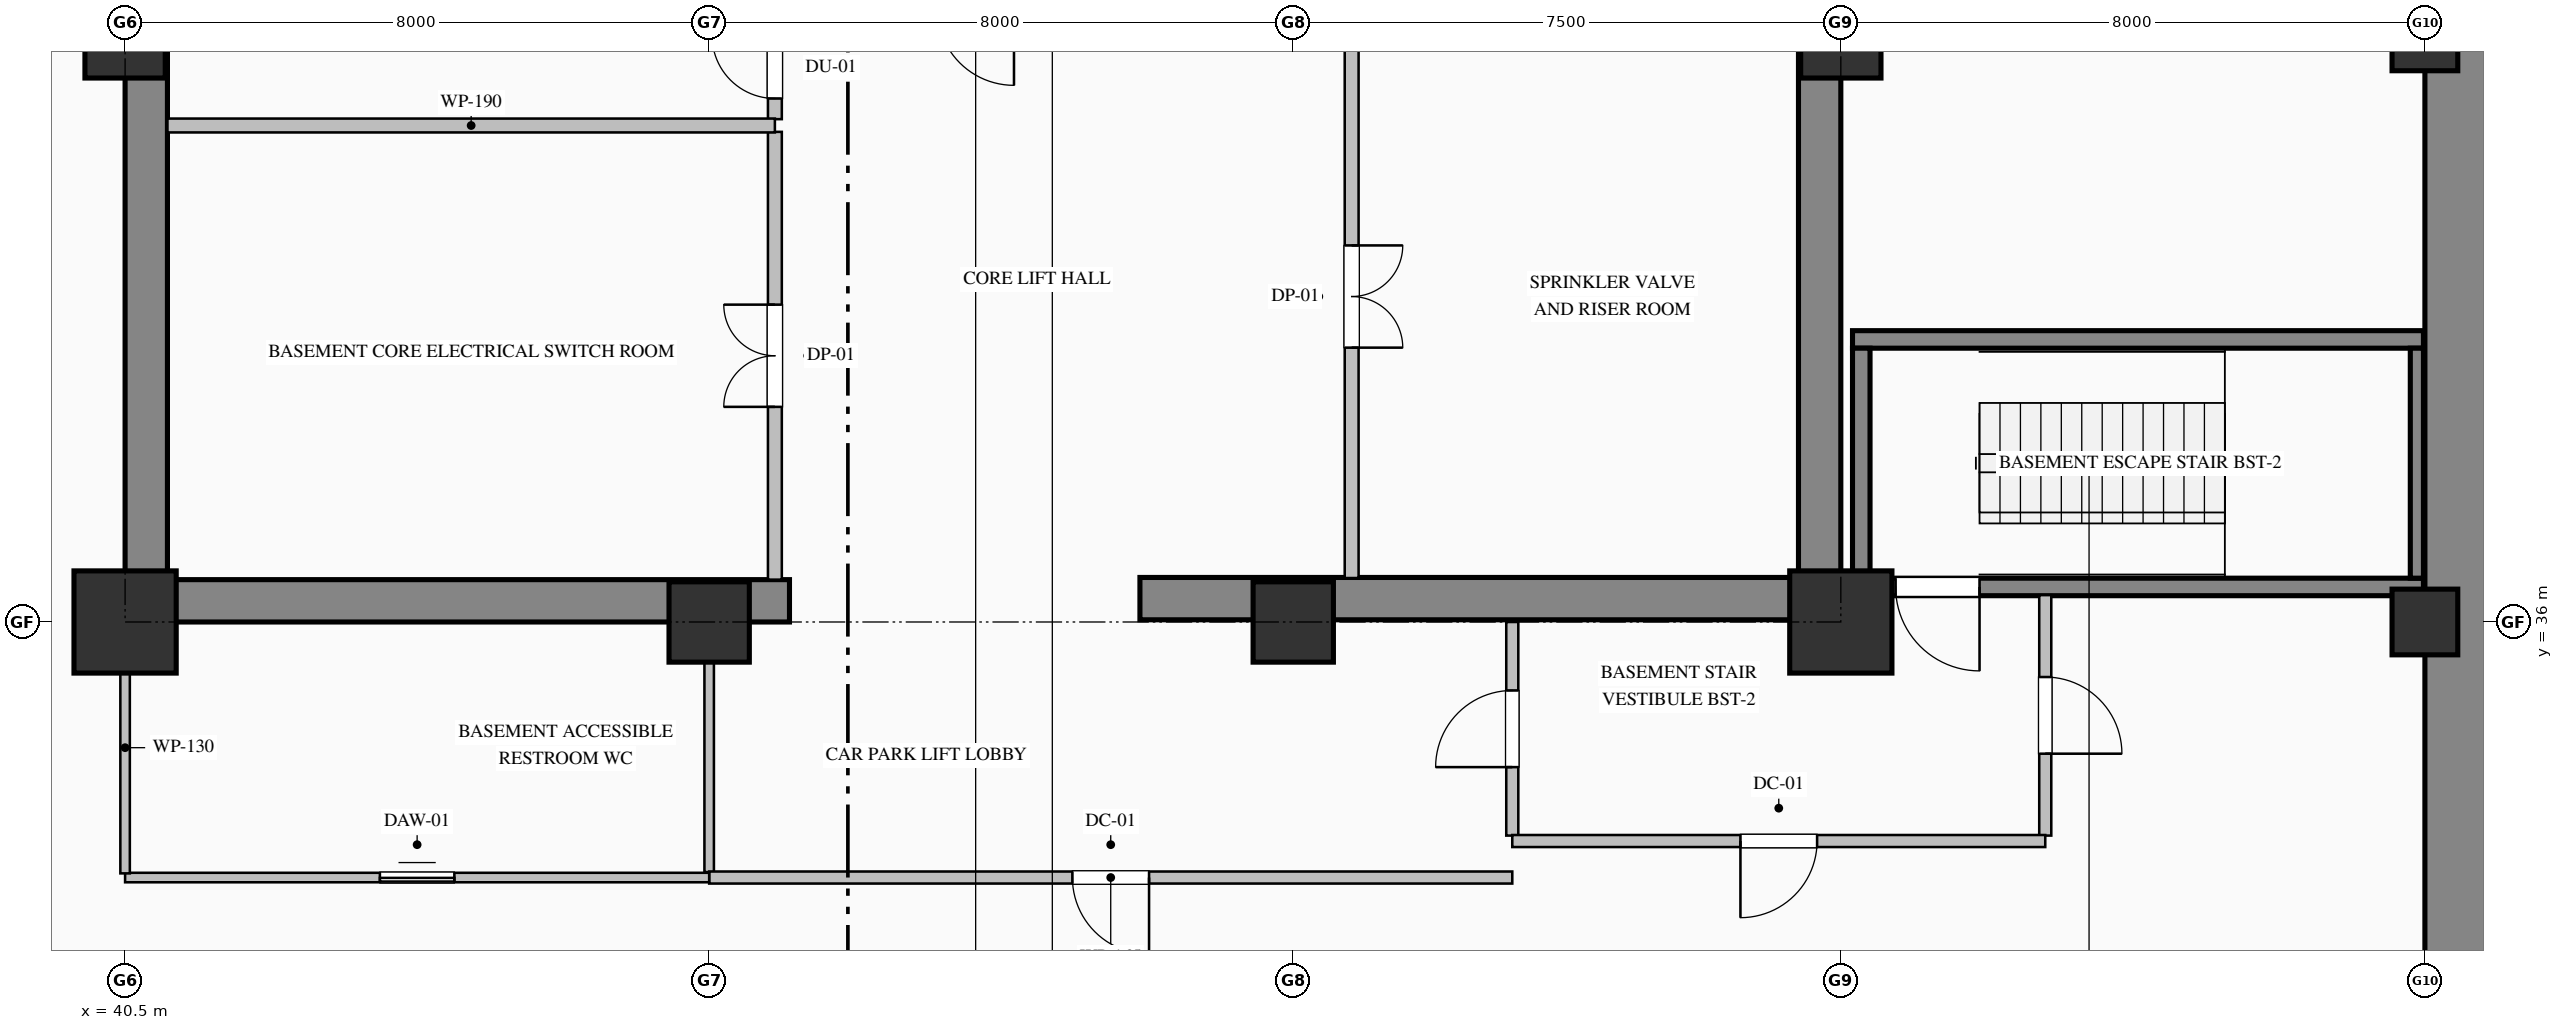
"""IFC4 building model, lengths in metres.
Left out: names, types, materials, properties, quantities, classifications, styles, units other than length and angle.
Written with IfcOpenShell. Run it as: python <this file> out.ifc"""

import sys

from ifc_helpers import new_model, si_unit, direction, frame, frame_2d, origin, origin_2d, place, context, subcontext, project, spatial, rectangle, hollow_rectangle, extrude, element, fill, save


model = new_model("IFC4")
c1 = context("Model", 3, precision=1e-05, world=origin(), true_north=direction((0.0, 1.0)))
c2 = subcontext(c1, "Body", "Model", "MODEL_VIEW")
j1 = project(units=[si_unit("LENGTHUNIT", "METRE"), si_unit("PLANEANGLEUNIT", "RADIAN")], contexts=[c1])
p1 = place(None, origin())
s1 = spatial("IfcSite", under=j1, at=p1, CompositionType="ELEMENT")
p2 = place(p1, origin())
s2 = spatial("IfcBuilding", under=s1, at=p2, CompositionType="ELEMENT")
p3 = place(p2, frame((0.0, 0.0, -13.8)))
s3 = spatial("IfcBuildingStorey", under=s2, at=p3, CompositionType="ELEMENT", Elevation=-13.8)
p4 = place(p3, frame((72.6, 0.0, -0.5), z_axis=(0.0, 0.0, 1.0), x_axis=(0.0, 1.0, 0.0)))
e1 = element("IfcWall", 1, at=p4, inside=s3, PredefinedType="USERDEFINED", context=c2, shape_type="SweptSolid", body=[
    extrude(rectangle(XDim=50.8, YDim=1.2, at=frame_2d((25.4, 0.0))), origin(), (0.0, 0.0, 1.0), 5.1),
])
p5 = place(p3, frame((63.71, 36.32, -0.5), z_axis=(0.0, 0.0, 1.0), x_axis=(0.0, 1.0, 0.0)))
e2 = element("IfcWall", 2, at=p5, inside=s3, PredefinedType="SHEAR", context=c2, shape_type="SweptSolid", body=[
    extrude(rectangle(XDim=15.1, YDim=0.58, at=frame_2d((7.55, 0.0))), origin(), (0.0, 0.0, 1.0), 4.74),
])
p6 = place(p3, frame((40.79, 36.58, -0.5), z_axis=(0.0, 0.0, 1.0), x_axis=(0.0, 1.0, 0.0)))
e3 = element("IfcWall", 3, at=p6, inside=s3, PredefinedType="SHEAR", context=c2, shape_type="SweptSolid", body=[
    extrude(rectangle(XDim=7.82, YDim=0.58, at=frame_2d((3.91, 0.0))), origin(), (0.0, 0.0, 1.0), 4.74),
])
p7 = place(p3, frame((40.5, 36.29, -0.5), z_axis=(0.0, 0.0, 1.0), x_axis=(1.0, 0.0, 0.0)))
e4 = element("IfcWall", 4, at=p7, inside=s3, PredefinedType="SHEAR", context=c2, shape_type="SweptSolid", body=[
    extrude(rectangle(XDim=9.1, YDim=0.58, at=frame_2d((4.55, 0.0))), origin(), (0.0, 0.0, 1.0), 4.74),
])
p8 = place(p3, frame((54.4, 36.32, -0.5), z_axis=(0.0, 0.0, 1.0), x_axis=(1.0, 0.0, 0.0)))
e5 = element("IfcWall", 5, at=p8, inside=s3, PredefinedType="SHEAR", context=c2, shape_type="SweptSolid", body=[
    extrude(rectangle(XDim=9.6, YDim=0.58, at=frame_2d((4.8, 0.0))), origin(), (0.0, 0.0, 1.0), 5.1),
])
p9 = place(p3, frame((40.5, 36.0, -0.5), z_axis=(0.0, 0.0, 1.0), x_axis=(1.0, 0.0, 0.0)))
e6 = element("IfcColumn", 6, at=p9, inside=s3, PredefinedType="COLUMN", context=c2, shape_type="SweptSolid", body=[
    extrude(hollow_rectangle(XDim=1.4, YDim=1.4, WallThickness=0.05, at=origin_2d()), origin(), (0.0, 0.0, 1.0), 5.1),
])
for number, where, z_axis, x_axis in (
    (7, (40.5, 44.0, -0.5), (0.0, 0.0, 1.0), (1.0, 0.0, 0.0)),
    (8, (48.5, 36.0, -0.5), (0.0, 0.0, 1.0), (1.0, 0.0, 0.0)),
    (9, (56.5, 36.0, -0.5), (0.0, 0.0, 1.0), (1.0, 0.0, 0.0)),
):
    element("IfcColumn", number, at=place(p3, frame(where, z_axis=z_axis, x_axis=x_axis)), inside=s3, PredefinedType="COLUMN", context=c2, shape_type="SweptSolid", body=[
        extrude(rectangle(XDim=1.1, YDim=1.1, at=origin_2d()), origin(), (0.0, 0.0, 1.0), 5.1),
    ])
p10 = place(p3, frame((64.0, 36.0, -0.5), z_axis=(0.0, 0.0, 1.0), x_axis=(1.0, 0.0, 0.0)))
e10 = element("IfcColumn", 10, at=p10, inside=s3, PredefinedType="COLUMN", context=c2, shape_type="SweptSolid", body=[
    extrude(hollow_rectangle(XDim=1.4, YDim=1.4, WallThickness=0.05, at=origin_2d()), origin(), (0.0, 0.0, 1.0), 5.1),
])
p11 = place(p3, frame((64.0, 44.0, -0.5), z_axis=(0.0, 0.0, 1.0), x_axis=(1.0, 0.0, 0.0)))
e11 = element("IfcColumn", 11, at=p11, inside=s3, PredefinedType="COLUMN", context=c2, shape_type="SweptSolid", body=[
    extrude(rectangle(XDim=1.1, YDim=1.1, at=origin_2d()), origin(), (0.0, 0.0, 1.0), 5.1),
])
for number, where, z_axis, x_axis in (
    (12, (72.0, 36.0, -0.5), (0.0, 0.0, 1.0), (1.0, 0.0, 0.0)),
    (13, (72.0, 44.0, -0.5), (0.0, 0.0, 1.0), (1.0, 0.0, 0.0)),
):
    element("IfcColumn", number, at=place(p3, frame(where, z_axis=z_axis, x_axis=x_axis)), inside=s3, PredefinedType="PILASTER", context=c2, shape_type="SweptSolid", body=[
        extrude(rectangle(XDim=0.9, YDim=0.9, at=origin_2d()), origin(), (0.0, 0.0, 1.0), 5.1),
    ])
p12 = place(p3, frame((64.16, 39.87, -0.5), z_axis=(0.0, 0.0, 1.0), x_axis=(1.0, 0.0, 0.0)))
e14 = element("IfcWall", 14, at=p12, inside=s3, PredefinedType="SOLIDWALL", context=c2, shape_type="SweptSolid", body=[
    extrude(rectangle(XDim=7.82, YDim=0.24, at=frame_2d((3.91, 0.0))), origin(), (0.0, 0.0, 1.0), 5.1),
])
p13 = place(p3, frame((71.98, 36.48, -0.5), z_axis=(0.0, 0.0, 1.0), x_axis=(-1.0, 0.0, 0.0)))
e15 = element("IfcWall", 15, at=p13, inside=s3, PredefinedType="SOLIDWALL", context=c2, shape_type="SweptSolid", body=[
    extrude(rectangle(XDim=7.82, YDim=0.24, at=frame_2d((3.91, 0.0))), origin(), (0.0, 0.0, 1.0), 5.1),
])
p14 = place(p13, frame((6.08, 0.0, 0.5)))
e16 = element("IfcOpeningElement", 16, at=p14, cuts=e15, PredefinedType="OPENING", context=c2, shape_type="SweptSolid", body=[
    extrude(rectangle(XDim=1.15, YDim=2.2, at=frame_2d((0.575, 1.1))), frame((0.0, 0.13, 0.0), z_axis=(0.0, -1.0, 0.0), x_axis=(1.0, 0.0, 0.0)), (0.0, 0.0, 1.0), 0.26),
])
p15 = place(p3, frame((64.28, 39.75, -0.5), z_axis=(0.0, 0.0, 1.0), x_axis=(0.0, -1.0, 0.0)))
e17 = element("IfcWall", 17, at=p15, inside=s3, PredefinedType="SOLIDWALL", context=c2, shape_type="SweptSolid", body=[
    extrude(rectangle(XDim=3.15, YDim=0.24, at=frame_2d((1.575, 0.0))), origin(), (0.0, 0.0, 1.0), 5.1),
])
p16 = place(p3, frame((71.89, 36.6, -0.5), z_axis=(0.0, 0.0, 1.0), x_axis=(0.0, 1.0, 0.0)))
e18 = element("IfcWall", 18, at=p16, inside=s3, PredefinedType="SOLIDWALL", context=c2, shape_type="SweptSolid", body=[
    extrude(rectangle(XDim=3.15, YDim=0.18, at=frame_2d((1.575, 0.0))), origin(), (0.0, 0.0, 1.0), 5.1),
])
p17 = place(p3, frame((49.4, 36.58, 0.0), z_axis=(0.0, 0.0, 1.0), x_axis=(0.0, 1.0, 0.0)))
e19 = element("IfcWall", 19, at=p17, inside=s3, PredefinedType="PARTITIONING", context=c2, shape_type="SweptSolid", body=[
    extrude(rectangle(XDim=6.133, YDim=0.19, at=frame_2d((3.066, 0.0))), origin(), (0.0, 0.0, 1.0), 3.332),
])
p18 = place(p17, frame((2.366, 0.0, 0.0)))
e20 = element("IfcOpeningElement", 20, at=p18, cuts=e19, PredefinedType="OPENING", context=c2, shape_type="SweptSolid", body=[
    extrude(rectangle(XDim=1.4, YDim=2.25, at=frame_2d((0.7, 1.125))), frame((0.0, 0.105, 0.0), z_axis=(0.0, -1.0, 0.0), x_axis=(1.0, 0.0, 0.0)), (0.0, 0.0, 1.0), 0.21),
])
p19 = place(p3, frame((49.4, 42.887, 0.0), z_axis=(0.0, 0.0, 1.0), x_axis=(0.0, 1.0, 0.0)))
e21 = element("IfcWall", 21, at=p19, inside=s3, PredefinedType="PARTITIONING", context=c2, shape_type="SweptSolid", body=[
    extrude(rectangle(XDim=1.426, YDim=0.19, at=frame_2d((0.713, 0.0))), origin(), (0.0, 0.0, 1.0), 3.332),
])
p20 = place(p19, frame((0.283, 0.0, 0.0)))
e22 = element("IfcOpeningElement", 22, at=p20, cuts=e21, PredefinedType="OPENING", context=c2, shape_type="SweptSolid", body=[
    extrude(rectangle(XDim=0.86, YDim=2.1, at=frame_2d((0.43, 1.05))), frame((0.0, 0.105, 0.0), z_axis=(0.0, -1.0, 0.0), x_axis=(1.0, 0.0, 0.0)), (0.0, 0.0, 1.0), 0.21),
])
p21 = place(p3, frame((57.3, 44.313, 0.0), z_axis=(0.0, 0.0, 1.0), x_axis=(0.0, -1.0, 0.0)))
e23 = element("IfcWall", 23, at=p21, inside=s3, PredefinedType="PARTITIONING", context=c2, shape_type="SweptSolid", body=[
    extrude(rectangle(XDim=7.711, YDim=0.19, at=frame_2d((3.855, 0.0))), origin(), (0.0, 0.0, 1.0), 4.24),
])
p22 = place(p21, frame((3.156, 0.0, 0.0)))
e24 = element("IfcOpeningElement", 24, at=p22, cuts=e23, PredefinedType="OPENING", context=c2, shape_type="SweptSolid", body=[
    extrude(rectangle(XDim=1.4, YDim=2.25, at=frame_2d((0.7, 1.125))), frame((0.0, 0.105, 0.0), z_axis=(0.0, -1.0, 0.0), x_axis=(1.0, 0.0, 0.0)), (0.0, 0.0, 1.0), 0.21),
])
p23 = place(p3, frame((41.08, 42.8, 0.0), z_axis=(0.0, 0.0, 1.0), x_axis=(1.0, 0.0, 0.0)))
e25 = element("IfcWall", 25, at=p23, inside=s3, PredefinedType="PARTITIONING", context=c2, shape_type="SweptSolid", body=[
    extrude(rectangle(XDim=8.32, YDim=0.19, at=frame_2d((4.16, 0.0))), origin(), (0.0, 0.0, 1.0), 4.24),
])
p24 = place(p3, frame((59.5, 33.074, 0.0), z_axis=(0.0, 0.0, 1.0), x_axis=(0.0, 1.0, 0.0)))
e26 = element("IfcWall", 26, at=p24, inside=s3, PredefinedType="PARTITIONING", context=c2, shape_type="SweptSolid", body=[
    extrude(rectangle(XDim=2.926, YDim=0.165, at=frame_2d((1.463, 0.0))), origin(), (0.0, 0.0, 1.0), 4.24),
])
p25 = place(p24, frame((0.938, 0.0, 0.0)))
e27 = element("IfcOpeningElement", 27, at=p25, cuts=e26, PredefinedType="OPENING", context=c2, shape_type="SweptSolid", body=[
    extrude(rectangle(XDim=1.05, YDim=2.15, at=frame_2d((0.525, 1.075))), frame((0.0, 0.093, 0.0), z_axis=(0.0, -1.0, 0.0), x_axis=(1.0, 0.0, 0.0)), (0.0, 0.0, 1.0), 0.185),
])
p26 = place(p3, frame((66.8, 36.368, 0.0), z_axis=(0.0, 0.0, 1.0), x_axis=(0.0, -1.0, 0.0)))
e28 = element("IfcWall", 28, at=p26, inside=s3, PredefinedType="PARTITIONING", context=c2, shape_type="SweptSolid", body=[
    extrude(rectangle(XDim=3.293, YDim=0.165, at=frame_2d((1.647, 0.0))), origin(), (0.0, 0.0, 1.0), 4.24),
])
p27 = place(p26, frame((1.122, 0.0, 0.0)))
e29 = element("IfcOpeningElement", 29, at=p27, cuts=e28, PredefinedType="OPENING", context=c2, shape_type="SweptSolid", body=[
    extrude(rectangle(XDim=1.05, YDim=2.15, at=frame_2d((0.525, 1.075))), frame((0.0, 0.093, 0.0), z_axis=(0.0, -1.0, 0.0), x_axis=(1.0, 0.0, 0.0)), (0.0, 0.0, 1.0), 0.185),
])
p28 = place(p3, frame((66.8, 33.0, 0.0), z_axis=(0.0, 0.0, 1.0), x_axis=(-1.0, 0.0, 0.0)))
e30 = element("IfcWall", 30, at=p28, inside=s3, PredefinedType="PARTITIONING", context=c2, shape_type="SweptSolid", body=[
    extrude(rectangle(XDim=7.3, YDim=0.165, at=frame_2d((3.65, 0.0))), origin(), (0.0, 0.0, 1.0), 4.24),
])
p29 = place(p28, frame((3.125, 0.0, 0.0)))
e31 = element("IfcOpeningElement", 31, at=p29, cuts=e30, PredefinedType="OPENING", context=c2, shape_type="SweptSolid", body=[
    extrude(rectangle(XDim=1.05, YDim=2.15, at=frame_2d((0.525, 1.075))), frame((0.0, 0.093, 0.0), z_axis=(0.0, -1.0, 0.0), x_axis=(1.0, 0.0, 0.0)), (0.0, 0.0, 1.0), 0.185),
])
p30 = place(p3, frame((48.5, 32.574, 0.0), z_axis=(0.0, 0.0, 1.0), x_axis=(0.0, 1.0, 0.0)))
e32 = element("IfcWall", 32, at=p30, inside=s3, PredefinedType="PARTITIONING", context=c2, shape_type="SweptSolid", body=[
    extrude(rectangle(XDim=3.426, YDim=0.13, at=frame_2d((1.713, 0.0))), origin(), (0.0, 0.0, 1.0), 3.332),
])
p31 = place(p3, frame((59.5, 32.5, 0.0), z_axis=(0.0, 0.0, 1.0), x_axis=(-1.0, 0.0, 0.0)))
e33 = element("IfcWall", 33, at=p31, inside=s3, PredefinedType="PARTITIONING", context=c2, shape_type="SweptSolid", body=[
    extrude(rectangle(XDim=11.0, YDim=0.165, at=frame_2d((5.5, 0.0))), origin(), (0.0, 0.0, 1.0), 4.24),
])
p32 = place(p31, frame((4.975, 0.0, 0.0)))
e34 = element("IfcOpeningElement", 34, at=p32, cuts=e33, PredefinedType="OPENING", context=c2, shape_type="SweptSolid", body=[
    extrude(rectangle(XDim=1.05, YDim=2.15, at=frame_2d((0.525, 1.075))), frame((0.0, 0.093, 0.0), z_axis=(0.0, -1.0, 0.0), x_axis=(1.0, 0.0, 0.0)), (0.0, 0.0, 1.0), 0.185),
])
p33 = place(p3, frame((48.5, 32.5, 0.0), z_axis=(0.0, 0.0, 1.0), x_axis=(-1.0, 0.0, 0.0)))
e35 = element("IfcWall", 35, at=p33, inside=s3, PredefinedType="PARTITIONING", context=c2, shape_type="SweptSolid", body=[
    extrude(rectangle(XDim=8.0, YDim=0.13, at=frame_2d((4.0, 0.0))), origin(), (0.0, 0.0, 1.0), 4.24),
])
p34 = place(p33, frame((3.49, 0.0, 0.0)))
e36 = element("IfcOpeningElement", 36, at=p34, cuts=e35, PredefinedType="OPENING", context=c2, shape_type="SweptSolid", body=[
    extrude(rectangle(XDim=1.02, YDim=2.15, at=frame_2d((0.51, 1.075))), frame((0.0, 0.075, 0.0), z_axis=(0.0, -1.0, 0.0), x_axis=(1.0, 0.0, 0.0)), (0.0, 0.0, 1.0), 0.15),
])
p35 = place(p3, frame((40.5, 32.557, 0.0), z_axis=(0.0, 0.0, 1.0), x_axis=(0.0, 1.0, 0.0)))
e37 = element("IfcWall", 37, at=p35, inside=s3, PredefinedType="PARTITIONING", context=c2, shape_type="SweptSolid", body=[
    extrude(rectangle(XDim=3.443, YDim=0.13, at=frame_2d((1.722, 0.0))), origin(), (0.0, 0.0, 1.0), 3.332),
])
p36 = place(p14, origin())
e38 = element("IfcDoor", 38, at=p36, inside=s3, OperationType="SINGLE_SWING_LEFT", PredefinedType="DOOR", context=c2, shape_type="SweptSolid", body=[
    extrude(rectangle(XDim=1.15, YDim=2.2, at=frame_2d((0.575, 1.1))), frame((0.0, 0.025, 0.0), z_axis=(0.0, -1.0, 0.0), x_axis=(1.0, 0.0, 0.0)), (0.0, 0.0, 1.0), 0.05),
])
fill(e16, e38)
p37 = place(p32, origin())
e39 = element("IfcDoor", 39, at=p37, inside=s3, OperationType="SINGLE_SWING_LEFT", PredefinedType="DOOR", context=c2, shape_type="SweptSolid", body=[
    extrude(rectangle(XDim=1.05, YDim=2.15, at=frame_2d((0.525, 1.075))), frame((0.0, 0.025, 0.0), z_axis=(0.0, -1.0, 0.0), x_axis=(1.0, 0.0, 0.0)), (0.0, 0.0, 1.0), 0.05),
])
fill(e34, e39)
p38 = place(p29, origin())
e40 = element("IfcDoor", 40, at=p38, inside=s3, OperationType="SINGLE_SWING_RIGHT", PredefinedType="DOOR", context=c2, shape_type="SweptSolid", body=[
    extrude(rectangle(XDim=1.05, YDim=2.15, at=frame_2d((0.525, 1.075))), frame((0.0, 0.025, 0.0), z_axis=(0.0, -1.0, 0.0), x_axis=(1.0, 0.0, 0.0)), (0.0, 0.0, 1.0), 0.05),
])
fill(e31, e40)
p39 = place(p27, origin())
e41 = element("IfcDoor", 41, at=p39, inside=s3, OperationType="SINGLE_SWING_RIGHT", PredefinedType="DOOR", context=c2, shape_type="SweptSolid", body=[
    extrude(rectangle(XDim=1.05, YDim=2.15, at=frame_2d((0.525, 1.075))), frame((0.0, 0.025, 0.0), z_axis=(0.0, -1.0, 0.0), x_axis=(1.0, 0.0, 0.0)), (0.0, 0.0, 1.0), 0.05),
])
fill(e29, e41)
p40 = place(p25, origin())
e42 = element("IfcDoor", 42, at=p40, inside=s3, OperationType="SINGLE_SWING_LEFT", PredefinedType="DOOR", context=c2, shape_type="SweptSolid", body=[
    extrude(rectangle(XDim=1.05, YDim=2.15, at=frame_2d((0.525, 1.075))), frame((0.0, 0.025, 0.0), z_axis=(0.0, -1.0, 0.0), x_axis=(1.0, 0.0, 0.0)), (0.0, 0.0, 1.0), 0.05),
])
fill(e27, e42)
p41 = place(p18, origin())
e43 = element("IfcDoor", 43, at=p41, inside=s3, OperationType="DOUBLE_DOOR_SINGLE_SWING", PredefinedType="DOOR", context=c2, shape_type="SweptSolid", body=[
    extrude(rectangle(XDim=1.4, YDim=2.25, at=frame_2d((0.7, 1.125))), frame((0.0, 0.025, 0.0), z_axis=(0.0, -1.0, 0.0), x_axis=(1.0, 0.0, 0.0)), (0.0, 0.0, 1.0), 0.05),
])
fill(e20, e43)
p42 = place(p20, origin())
e44 = element("IfcDoor", 44, at=p42, inside=s3, OperationType="SINGLE_SWING_RIGHT", PredefinedType="DOOR", context=c2, shape_type="SweptSolid", body=[
    extrude(rectangle(XDim=0.86, YDim=2.1, at=frame_2d((0.43, 1.05))), frame((0.0, 0.025, 0.0), z_axis=(0.0, -1.0, 0.0), x_axis=(1.0, 0.0, 0.0)), (0.0, 0.0, 1.0), 0.05),
])
fill(e22, e44)
p43 = place(p22, origin())
e45 = element("IfcDoor", 45, at=p43, inside=s3, OperationType="DOUBLE_DOOR_SINGLE_SWING", PredefinedType="DOOR", context=c2, shape_type="SweptSolid", body=[
    extrude(rectangle(XDim=1.4, YDim=2.25, at=frame_2d((0.7, 1.125))), frame((0.0, 0.025, 0.0), z_axis=(0.0, -1.0, 0.0), x_axis=(1.0, 0.0, 0.0)), (0.0, 0.0, 1.0), 0.05),
])
fill(e24, e45)
p44 = place(p34, origin())
e46 = element("IfcDoor", 46, at=p44, inside=s3, OperationType="SLIDING_TO_LEFT", PredefinedType="DOOR", context=c2, shape_type="SweptSolid", body=[
    extrude(rectangle(XDim=1.02, YDim=2.15, at=frame_2d((0.51, 1.075))), frame((0.0, 0.025, 0.0), z_axis=(0.0, -1.0, 0.0), x_axis=(1.0, 0.0, 0.0)), (0.0, 0.0, 1.0), 0.05),
])
fill(e36, e46)
save(model, sys.argv[1])
